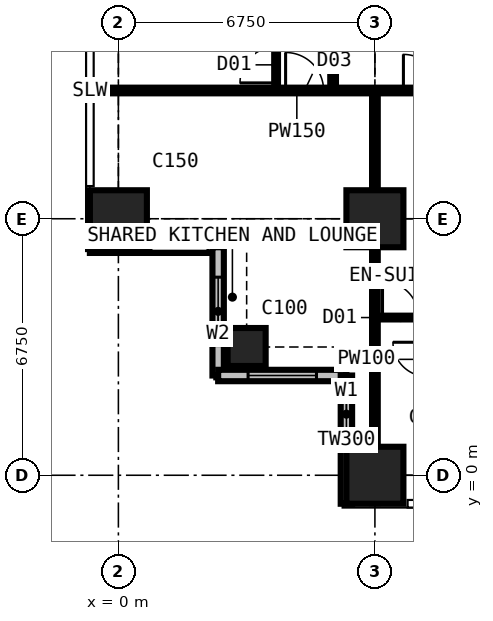
"""IFC4 building model, lengths in metres.
Left out: names, types, materials, properties, quantities, classifications, styles, units other than length and angle.
Written with IfcOpenShell. Run it as: python <this file> out.ifc"""

import sys

from ifc_helpers import new_model, si_unit, direction, frame, frame_2d, origin, origin_2d, place, context, subcontext, project, spatial, rectangle, extrude, element, fill, save


model = new_model("IFC4")
c1 = context("Model", 3, precision=1e-05, world=origin(), true_north=direction((0.0, 1.0)))
c2 = subcontext(c1, "Body", "Model", "MODEL_VIEW")
j1 = project(units=[si_unit("LENGTHUNIT", "METRE"), si_unit("PLANEANGLEUNIT", "RADIAN")], contexts=[c1])
p1 = place(None, origin())
s1 = spatial("IfcSite", under=j1, at=p1, CompositionType="ELEMENT")
p2 = place(p1, origin())
s2 = spatial("IfcBuilding", under=s1, at=p2, CompositionType="ELEMENT")
p3 = place(p2, frame((0.0, 0.0, 108.9)))
s3 = spatial("IfcBuildingStorey", under=s2, at=p3, CompositionType="ELEMENT", Elevation=108.9)
p4 = place(p3, frame((0.0, 6.75, 0.0), z_axis=(0.0, 0.0, 1.0), x_axis=(1.0, 0.0, 0.0)))
e1 = element("IfcColumn", 1, at=p4, inside=s3, PredefinedType="COLUMN", context=c2, shape_type="SweptSolid", body=[
    extrude(rectangle(XDim=1.5, YDim=1.5, at=origin_2d()), origin(), (0.0, 0.0, 1.0), 3.6),
])
p5 = place(p3, frame((3.375, 3.375, 0.0), z_axis=(0.0, 0.0, 1.0), x_axis=(1.0, 0.0, 0.0)))
e2 = element("IfcColumn", 2, at=p5, inside=s3, PredefinedType="COLUMN", context=c2, shape_type="SweptSolid", body=[
    extrude(rectangle(XDim=1.0, YDim=1.0, at=origin_2d()), origin(), (0.0, 0.0, 1.0), 3.6),
])
for number, where, z_axis, x_axis in (
    (3, (6.75, 0.0, 0.0), (0.0, 0.0, 1.0), (1.0, 0.0, 0.0)),
    (4, (6.75, 6.75, 0.0), (0.0, 0.0, 1.0), (1.0, 0.0, 0.0)),
):
    element("IfcColumn", number, at=place(p3, frame(where, z_axis=z_axis, x_axis=x_axis)), inside=s3, PredefinedType="COLUMN", context=c2, shape_type="SweptSolid", body=[
        extrude(rectangle(XDim=1.5, YDim=1.5, at=origin_2d()), origin(), (0.0, 0.0, 1.0), 3.6),
    ])
p6 = place(p3, frame((-0.75, 6.0, 0.0), z_axis=(0.0, 0.0, 1.0), x_axis=(1.0, 0.0, 0.0)))
e5 = element("IfcWall", 5, at=p6, inside=s3, PredefinedType="SOLIDWALL", context=c2, shape_type="SweptSolid", body=[
    extrude(rectangle(XDim=3.375, YDim=0.3, at=frame_2d((1.688, 0.0))), origin(), (0.0, 0.0, 1.0), 3.375),
])
p7 = place(p6, frame((1.607, 0.0, 0.9)))
e6 = element("IfcOpeningElement", 6, at=p7, cuts=e5, PredefinedType="OPENING", context=c2, shape_type="SweptSolid", body=[
    extrude(rectangle(XDim=1.5, YDim=1.8, at=frame_2d((0.75, 0.9))), frame((0.0, 0.16, 0.0), z_axis=(0.0, -1.0, 0.0), x_axis=(1.0, 0.0, 0.0)), (0.0, 0.0, 1.0), 0.32),
])
p8 = place(p3, frame((2.625, 6.0, 0.0), z_axis=(0.0, 0.0, 1.0), x_axis=(0.0, -1.0, 0.0)))
e7 = element("IfcWall", 7, at=p8, inside=s3, PredefinedType="SOLIDWALL", context=c2, shape_type="SweptSolid", body=[
    extrude(rectangle(XDim=3.375, YDim=0.3, at=frame_2d((1.688, 0.0))), origin(), (0.0, 0.0, 1.0), 3.375),
])
p9 = place(p8, frame((0.788, 0.0, 0.6)))
e8 = element("IfcOpeningElement", 8, at=p9, cuts=e7, PredefinedType="OPENING", context=c2, shape_type="SweptSolid", body=[
    extrude(rectangle(XDim=1.8, YDim=2.1, at=frame_2d((0.9, 1.05))), frame((0.0, 0.16, 0.0), z_axis=(0.0, -1.0, 0.0), x_axis=(1.0, 0.0, 0.0)), (0.0, 0.0, 1.0), 0.32),
])
p10 = place(p3, frame((2.625, 2.625, 0.0), z_axis=(0.0, 0.0, 1.0), x_axis=(1.0, 0.0, 0.0)))
e9 = element("IfcWall", 9, at=p10, inside=s3, PredefinedType="SOLIDWALL", context=c2, shape_type="SweptSolid", body=[
    extrude(rectangle(XDim=3.375, YDim=0.3, at=frame_2d((1.688, 0.0))), origin(), (0.0, 0.0, 1.0), 3.375),
])
p11 = place(p10, frame((0.788, 0.0, 0.6)))
e10 = element("IfcOpeningElement", 10, at=p11, cuts=e9, PredefinedType="OPENING", context=c2, shape_type="SweptSolid", body=[
    extrude(rectangle(XDim=1.8, YDim=2.1, at=frame_2d((0.9, 1.05))), frame((0.0, 0.16, 0.0), z_axis=(0.0, -1.0, 0.0), x_axis=(1.0, 0.0, 0.0)), (0.0, 0.0, 1.0), 0.32),
])
p12 = place(p3, frame((6.0, 2.625, 0.0), z_axis=(0.0, 0.0, 1.0), x_axis=(0.0, -1.0, 0.0)))
e11 = element("IfcWall", 11, at=p12, inside=s3, PredefinedType="SOLIDWALL", context=c2, shape_type="SweptSolid", body=[
    extrude(rectangle(XDim=3.375, YDim=0.3, at=frame_2d((1.688, 0.0))), origin(), (0.0, 0.0, 1.0), 3.375),
])
p13 = place(p12, frame((0.268, 0.0, 0.9)))
e12 = element("IfcOpeningElement", 12, at=p13, cuts=e11, PredefinedType="OPENING", context=c2, shape_type="SweptSolid", body=[
    extrude(rectangle(XDim=1.5, YDim=1.8, at=frame_2d((0.75, 0.9))), frame((0.0, 0.16, 0.0), z_axis=(0.0, -1.0, 0.0), x_axis=(1.0, 0.0, 0.0)), (0.0, 0.0, 1.0), 0.32),
])
p14 = place(p3, frame((-0.734, 10.125, 0.0), z_axis=(0.0, 0.0, 1.0), x_axis=(1.0, 0.0, 0.0)))
e13 = element("IfcWall", 13, at=p14, inside=s3, PredefinedType="PARTITIONING", context=c2, shape_type="SweptSolid", body=[
    extrude(rectangle(XDim=10.859, YDim=0.15, at=frame_2d((5.429, 0.0))), origin(), (0.0, 0.0, 1.0), 3.375),
])
p15 = place(p14, frame((5.134, 0.0, 0.0)))
e14 = element("IfcOpeningElement", 14, at=p15, cuts=e13, PredefinedType="OPENING", context=c2, shape_type="SweptSolid", body=[
    extrude(rectangle(XDim=1.0, YDim=2.2, at=frame_2d((0.5, 1.1))), frame((0.0, 0.085, 0.0), z_axis=(0.0, -1.0, 0.0), x_axis=(1.0, 0.0, 0.0)), (0.0, 0.0, 1.0), 0.17),
])
p16 = place(p14, frame((8.234, 0.0, 0.0)))
e15 = element("IfcOpeningElement", 15, at=p16, cuts=e13, PredefinedType="OPENING", context=c2, shape_type="SweptSolid", body=[
    extrude(rectangle(XDim=0.95, YDim=2.2, at=frame_2d((0.475, 1.1))), frame((0.0, 0.085, 0.0), z_axis=(0.0, -1.0, 0.0), x_axis=(1.0, 0.0, 0.0)), (0.0, 0.0, 1.0), 0.17),
])
p17 = place(p3, frame((4.15, 10.125, 0.0), z_axis=(0.0, 0.0, 1.0), x_axis=(0.0, 1.0, 0.0)))
e16 = element("IfcWall", 16, at=p17, inside=s3, PredefinedType="PARTITIONING", context=c2, shape_type="SweptSolid", body=[
    extrude(rectangle(XDim=16.875, YDim=0.1, at=frame_2d((8.438, 0.0))), origin(), (0.0, 0.0, 1.0), 3.375),
])
p18 = place(p17, frame((0.2, 0.0, 0.0)))
e17 = element("IfcOpeningElement", 17, at=p18, cuts=e16, PredefinedType="OPENING", context=c2, shape_type="SweptSolid", body=[
    extrude(rectangle(XDim=0.95, YDim=2.2, at=frame_2d((0.475, 1.1))), frame((0.0, 0.06, 0.0), z_axis=(0.0, -1.0, 0.0), x_axis=(1.0, 0.0, 0.0)), (0.0, 0.0, 1.0), 0.12),
])
p19 = place(p17, frame((3.625, 0.0, 0.0)))
e18 = element("IfcOpeningElement", 18, at=p19, cuts=e16, PredefinedType="OPENING", context=c2, shape_type="SweptSolid", body=[
    extrude(rectangle(XDim=0.95, YDim=2.2, at=frame_2d((0.475, 1.1))), frame((0.0, 0.06, 0.0), z_axis=(0.0, -1.0, 0.0), x_axis=(1.0, 0.0, 0.0)), (0.0, 0.0, 1.0), 0.12),
])
p20 = place(p17, frame((7.0, 0.0, 0.0)))
e19 = element("IfcOpeningElement", 19, at=p20, cuts=e16, PredefinedType="OPENING", context=c2, shape_type="SweptSolid", body=[
    extrude(rectangle(XDim=0.95, YDim=2.2, at=frame_2d((0.475, 1.1))), frame((0.0, 0.06, 0.0), z_axis=(0.0, -1.0, 0.0), x_axis=(1.0, 0.0, 0.0)), (0.0, 0.0, 1.0), 0.12),
])
p21 = place(p17, frame((10.375, 0.0, 0.0)))
e20 = element("IfcOpeningElement", 20, at=p21, cuts=e16, PredefinedType="OPENING", context=c2, shape_type="SweptSolid", body=[
    extrude(rectangle(XDim=0.95, YDim=2.2, at=frame_2d((0.475, 1.1))), frame((0.0, 0.06, 0.0), z_axis=(0.0, -1.0, 0.0), x_axis=(1.0, 0.0, 0.0)), (0.0, 0.0, 1.0), 0.12),
])
p22 = place(p17, frame((13.75, 0.0, 0.0)))
e21 = element("IfcOpeningElement", 21, at=p22, cuts=e16, PredefinedType="OPENING", context=c2, shape_type="SweptSolid", body=[
    extrude(rectangle(XDim=0.95, YDim=2.2, at=frame_2d((0.475, 1.1))), frame((0.0, 0.06, 0.0), z_axis=(0.0, -1.0, 0.0), x_axis=(1.0, 0.0, 0.0)), (0.0, 0.0, 1.0), 0.12),
])
p23 = place(p3, frame((5.65, 10.125, 0.0), z_axis=(0.0, 0.0, 1.0), x_axis=(0.0, 1.0, 0.0)))
e22 = element("IfcWall", 22, at=p23, inside=s3, PredefinedType="PARTITIONING", context=c2, shape_type="SweptSolid", body=[
    extrude(rectangle(XDim=10.762, YDim=0.15, at=frame_2d((5.381, 0.0))), origin(), (0.0, 0.0, 1.0), 3.375),
])
p24 = place(p3, frame((6.75, -0.734, 0.0), z_axis=(0.0, 0.0, 1.0), x_axis=(0.0, 1.0, 0.0)))
e23 = element("IfcWall", 23, at=p24, inside=s3, PredefinedType="PARTITIONING", context=c2, shape_type="SweptSolid", body=[
    extrude(rectangle(XDim=10.859, YDim=0.15, at=frame_2d((5.429, 0.0))), origin(), (0.0, 0.0, 1.0), 2.877),
])
p25 = place(p3, frame((6.75, 4.15, 0.0), z_axis=(0.0, 0.0, 1.0), x_axis=(1.0, 0.0, 0.0)))
e24 = element("IfcWall", 24, at=p25, inside=s3, PredefinedType="PARTITIONING", context=c2, shape_type="SweptSolid", body=[
    extrude(rectangle(XDim=23.625, YDim=0.1, at=frame_2d((11.812, 0.0))), origin(), (0.0, 0.0, 1.0), 3.375),
])
p26 = place(p25, frame((0.2, 0.0, 0.0)))
e25 = element("IfcOpeningElement", 25, at=p26, cuts=e24, PredefinedType="OPENING", context=c2, shape_type="SweptSolid", body=[
    extrude(rectangle(XDim=0.95, YDim=2.2, at=frame_2d((0.475, 1.1))), frame((0.0, 0.06, 0.0), z_axis=(0.0, -1.0, 0.0), x_axis=(1.0, 0.0, 0.0)), (0.0, 0.0, 1.0), 0.12),
])
p27 = place(p25, frame((3.625, 0.0, 0.0)))
e26 = element("IfcOpeningElement", 26, at=p27, cuts=e24, PredefinedType="OPENING", context=c2, shape_type="SweptSolid", body=[
    extrude(rectangle(XDim=0.95, YDim=2.2, at=frame_2d((0.475, 1.1))), frame((0.0, 0.06, 0.0), z_axis=(0.0, -1.0, 0.0), x_axis=(1.0, 0.0, 0.0)), (0.0, 0.0, 1.0), 0.12),
])
p28 = place(p25, frame((7.0, 0.0, 0.0)))
e27 = element("IfcOpeningElement", 27, at=p28, cuts=e24, PredefinedType="OPENING", context=c2, shape_type="SweptSolid", body=[
    extrude(rectangle(XDim=0.95, YDim=2.2, at=frame_2d((0.475, 1.1))), frame((0.0, 0.06, 0.0), z_axis=(0.0, -1.0, 0.0), x_axis=(1.0, 0.0, 0.0)), (0.0, 0.0, 1.0), 0.12),
])
p29 = place(p25, frame((10.375, 0.0, 0.0)))
e28 = element("IfcOpeningElement", 28, at=p29, cuts=e24, PredefinedType="OPENING", context=c2, shape_type="SweptSolid", body=[
    extrude(rectangle(XDim=0.95, YDim=2.2, at=frame_2d((0.475, 1.1))), frame((0.0, 0.06, 0.0), z_axis=(0.0, -1.0, 0.0), x_axis=(1.0, 0.0, 0.0)), (0.0, 0.0, 1.0), 0.12),
])
p30 = place(p25, frame((13.75, 0.0, 0.0)))
e29 = element("IfcOpeningElement", 29, at=p30, cuts=e24, PredefinedType="OPENING", context=c2, shape_type="SweptSolid", body=[
    extrude(rectangle(XDim=0.95, YDim=2.2, at=frame_2d((0.475, 1.1))), frame((0.0, 0.06, 0.0), z_axis=(0.0, -1.0, 0.0), x_axis=(1.0, 0.0, 0.0)), (0.0, 0.0, 1.0), 0.12),
])
p31 = place(p25, frame((17.125, 0.0, 0.0)))
e30 = element("IfcOpeningElement", 30, at=p31, cuts=e24, PredefinedType="OPENING", context=c2, shape_type="SweptSolid", body=[
    extrude(rectangle(XDim=0.95, YDim=2.2, at=frame_2d((0.475, 1.1))), frame((0.0, 0.06, 0.0), z_axis=(0.0, -1.0, 0.0), x_axis=(1.0, 0.0, 0.0)), (0.0, 0.0, 1.0), 0.12),
])
p32 = place(p25, frame((20.5, 0.0, 0.0)))
e31 = element("IfcOpeningElement", 31, at=p32, cuts=e24, PredefinedType="OPENING", context=c2, shape_type="SweptSolid", body=[
    extrude(rectangle(XDim=0.95, YDim=2.2, at=frame_2d((0.475, 1.1))), frame((0.0, 0.06, 0.0), z_axis=(0.0, -1.0, 0.0), x_axis=(1.0, 0.0, 0.0)), (0.0, 0.0, 1.0), 0.12),
])
p33 = place(p7, origin())
e32 = element("IfcWindow", 32, at=p33, inside=s3, PartitioningType="SINGLE_PANEL", PredefinedType="WINDOW", context=c2, shape_type="SweptSolid", body=[
    extrude(rectangle(XDim=1.5, YDim=1.8, at=frame_2d((0.75, 0.9))), frame((0.0, 0.03, 0.0), z_axis=(0.0, -1.0, 0.0), x_axis=(1.0, 0.0, 0.0)), (0.0, 0.0, 1.0), 0.06),
])
fill(e6, e32)
p34 = place(p9, origin())
e33 = element("IfcWindow", 33, at=p34, inside=s3, PartitioningType="SINGLE_PANEL", PredefinedType="WINDOW", context=c2, shape_type="SweptSolid", body=[
    extrude(rectangle(XDim=1.8, YDim=2.1, at=frame_2d((0.9, 1.05))), frame((0.0, 0.03, 0.0), z_axis=(0.0, -1.0, 0.0), x_axis=(1.0, 0.0, 0.0)), (0.0, 0.0, 1.0), 0.06),
])
fill(e8, e33)
p35 = place(p11, origin())
e34 = element("IfcWindow", 34, at=p35, inside=s3, PartitioningType="SINGLE_PANEL", PredefinedType="WINDOW", context=c2, shape_type="SweptSolid", body=[
    extrude(rectangle(XDim=1.8, YDim=2.1, at=frame_2d((0.9, 1.05))), frame((0.0, 0.03, 0.0), z_axis=(0.0, -1.0, 0.0), x_axis=(1.0, 0.0, 0.0)), (0.0, 0.0, 1.0), 0.06),
])
fill(e10, e34)
p36 = place(p13, origin())
e35 = element("IfcWindow", 35, at=p36, inside=s3, PartitioningType="SINGLE_PANEL", PredefinedType="WINDOW", context=c2, shape_type="SweptSolid", body=[
    extrude(rectangle(XDim=1.5, YDim=1.8, at=frame_2d((0.75, 0.9))), frame((0.0, 0.03, 0.0), z_axis=(0.0, -1.0, 0.0), x_axis=(1.0, 0.0, 0.0)), (0.0, 0.0, 1.0), 0.06),
])
fill(e12, e35)
p37 = place(p26, origin())
e36 = element("IfcDoor", 36, at=p37, inside=s3, OperationType="SINGLE_SWING_LEFT", PredefinedType="DOOR", context=c2, shape_type="SweptSolid", body=[
    extrude(rectangle(XDim=0.95, YDim=2.2, at=frame_2d((0.475, 1.1))), frame((0.0, 0.025, 0.0), z_axis=(0.0, -1.0, 0.0), x_axis=(1.0, 0.0, 0.0)), (0.0, 0.0, 1.0), 0.05),
])
fill(e25, e36)
p38 = place(p15, origin())
e37 = element("IfcDoor", 37, at=p38, inside=s3, OperationType="SINGLE_SWING_LEFT", PredefinedType="DOOR", context=c2, shape_type="SweptSolid", body=[
    extrude(rectangle(XDim=1.0, YDim=2.2, at=frame_2d((0.5, 1.1))), frame((0.0, 0.025, 0.0), z_axis=(0.0, -1.0, 0.0), x_axis=(1.0, 0.0, 0.0)), (0.0, 0.0, 1.0), 0.05),
])
fill(e14, e37)
p39 = place(p18, origin())
e38 = element("IfcDoor", 38, at=p39, inside=s3, OperationType="SINGLE_SWING_LEFT", PredefinedType="DOOR", context=c2, shape_type="SweptSolid", body=[
    extrude(rectangle(XDim=0.95, YDim=2.2, at=frame_2d((0.475, 1.1))), frame((0.0, 0.025, 0.0), z_axis=(0.0, -1.0, 0.0), x_axis=(1.0, 0.0, 0.0)), (0.0, 0.0, 1.0), 0.05),
])
fill(e17, e38)
p40 = place(p16, origin())
e39 = element("IfcDoor", 39, at=p40, inside=s3, OperationType="SINGLE_SWING_LEFT", PredefinedType="DOOR", context=c2, shape_type="SweptSolid", body=[
    extrude(rectangle(XDim=0.95, YDim=2.2, at=frame_2d((0.475, 1.1))), frame((0.0, 0.025, 0.0), z_axis=(0.0, -1.0, 0.0), x_axis=(1.0, 0.0, 0.0)), (0.0, 0.0, 1.0), 0.05),
])
fill(e15, e39)
save(model, sys.argv[1])
